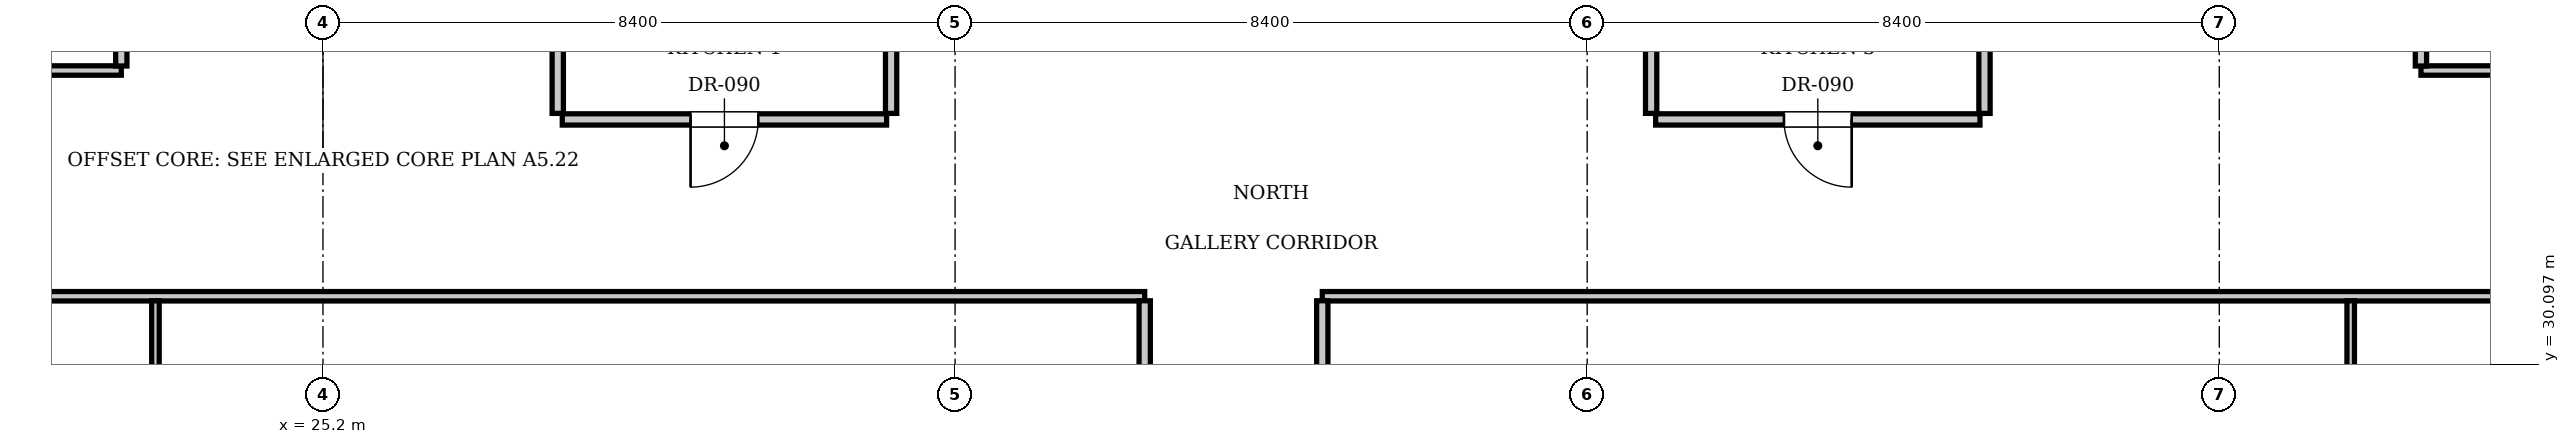
"""IFC4 building model, lengths in metres.
Left out: names, types, materials, properties, quantities, classifications, styles, units other than length and angle.
Written with IfcOpenShell. Run it as: python <this file> out.ifc"""

import sys

from ifc_helpers import new_model, si_unit, direction, frame, frame_2d, origin, place, context, subcontext, project, spatial, rectangle, extrude, element, fill, save


model = new_model("IFC4")
c1 = context("Model", 3, precision=1e-05, world=origin(), true_north=direction((0.0, 1.0)))
c2 = subcontext(c1, "Body", "Model", "MODEL_VIEW")
j1 = project(units=[si_unit("LENGTHUNIT", "METRE"), si_unit("PLANEANGLEUNIT", "RADIAN")], contexts=[c1])
p1 = place(None, origin())
s1 = spatial("IfcSite", under=j1, at=p1, CompositionType="ELEMENT")
p2 = place(p1, origin())
s2 = spatial("IfcBuilding", under=s1, at=p2, CompositionType="ELEMENT")
p3 = place(p2, frame((0.0, 0.0, 169.75)))
s3 = spatial("IfcBuildingStorey", under=s2, at=p3, CompositionType="ELEMENT", Elevation=169.75)
for number, where, z_axis, x_axis in (
    (1, (28.32, 33.43, 0.0), (0.0, 0.0, 1.0), (0.0, 1.0, 0.0)),
    (2, (32.75, 33.43, 0.0), (0.0, 0.0, 1.0), (0.0, 1.0, 0.0)),
):
    element("IfcWall", number, at=place(p3, frame(where, z_axis=z_axis, x_axis=x_axis)), inside=s3, PredefinedType="PARTITIONING", context=c2, shape_type="SweptSolid", body=[
        extrude(rectangle(XDim=2.69, YDim=0.15, at=frame_2d((1.345, 0.0))), origin(), (0.0, 0.0, 1.0), 3.61),
    ])
p4 = place(p3, frame((28.38, 33.35, 0.0), z_axis=(0.0, 0.0, 1.0), x_axis=(1.0, 0.0, 0.0)))
e3 = element("IfcWall", 3, at=p4, inside=s3, PredefinedType="PARTITIONING", context=c2, shape_type="SweptSolid", body=[
    extrude(rectangle(XDim=4.31, YDim=0.15, at=frame_2d((2.155, 0.0))), origin(), (0.0, 0.0, 1.0), 3.61),
])
p5 = place(p4, frame((1.705, 0.0, 0.0)))
e4 = element("IfcOpeningElement", 4, at=p5, cuts=e3, PredefinedType="OPENING", context=c2, shape_type="SweptSolid", body=[
    extrude(rectangle(XDim=0.9, YDim=2.1, at=frame_2d((0.45, 1.05))), frame((0.0, 0.085, 0.0), z_axis=(0.0, -1.0, 0.0), x_axis=(1.0, 0.0, 0.0)), (0.0, 0.0, 1.0), 0.17),
])
for number, where, z_axis, x_axis in (
    (5, (42.85, 33.43, 0.0), (0.0, 0.0, 1.0), (0.0, 1.0, 0.0)),
    (6, (47.28, 33.43, 0.0), (0.0, 0.0, 1.0), (0.0, 1.0, 0.0)),
):
    element("IfcWall", number, at=place(p3, frame(where, z_axis=z_axis, x_axis=x_axis)), inside=s3, PredefinedType="PARTITIONING", context=c2, shape_type="SweptSolid", body=[
        extrude(rectangle(XDim=2.69, YDim=0.15, at=frame_2d((1.345, 0.0))), origin(), (0.0, 0.0, 1.0), 3.61),
    ])
p6 = place(p3, frame((42.91, 33.35, 0.0), z_axis=(0.0, 0.0, 1.0), x_axis=(1.0, 0.0, 0.0)))
e7 = element("IfcWall", 7, at=p6, inside=s3, PredefinedType="PARTITIONING", context=c2, shape_type="SweptSolid", body=[
    extrude(rectangle(XDim=4.31, YDim=0.15, at=frame_2d((2.155, 0.0))), origin(), (0.0, 0.0, 1.0), 3.61),
])
p7 = place(p6, frame((1.705, 0.0, 0.0)))
e8 = element("IfcOpeningElement", 8, at=p7, cuts=e7, PredefinedType="OPENING", context=c2, shape_type="SweptSolid", body=[
    extrude(rectangle(XDim=0.9, YDim=2.1, at=frame_2d((0.45, 1.05))), frame((0.0, 0.085, 0.0), z_axis=(0.0, -1.0, 0.0), x_axis=(1.0, 0.0, 0.0)), (0.0, 0.0, 1.0), 0.17),
])
p8 = place(p3, frame((13.2, 31.0, 0.0), z_axis=(0.0, 0.0, 1.0), x_axis=(1.0, 0.0, 0.0)))
e9 = element("IfcWall", 9, at=p8, inside=s3, PredefinedType="PARTITIONING", context=c2, shape_type="SweptSolid", body=[
    extrude(rectangle(XDim=22.92, YDim=0.125, at=frame_2d((11.46, 0.0))), origin(), (0.0, 0.0, 1.0), 3.61),
])
p9 = place(p3, frame((38.48, 31.0, 0.0), z_axis=(0.0, 0.0, 1.0), x_axis=(1.0, 0.0, 0.0)))
e10 = element("IfcWall", 10, at=p9, inside=s3, PredefinedType="PARTITIONING", context=c2, shape_type="SweptSolid", body=[
    extrude(rectangle(XDim=23.92, YDim=0.125, at=frame_2d((11.96, 0.0))), origin(), (0.0, 0.0, 1.0), 3.61),
])
p10 = place(p3, frame((36.12, 26.7, 0.0), z_axis=(0.0, 0.0, 1.0), x_axis=(0.0, 1.0, 0.0)))
e11 = element("IfcWall", 11, at=p10, inside=s3, PredefinedType="PARTITIONING", context=c2, shape_type="SweptSolid", body=[
    extrude(rectangle(XDim=4.24, YDim=0.15, at=frame_2d((2.12, 0.0))), origin(), (0.0, 0.0, 1.0), 3.61),
])
p11 = place(p10, frame((1.645, 0.0, 0.0)))
e12 = element("IfcOpeningElement", 12, at=p11, cuts=e11, PredefinedType="OPENING", context=c2, shape_type="SweptSolid", body=[
    extrude(rectangle(XDim=0.95, YDim=2.15, at=frame_2d((0.475, 1.075))), frame((0.0, 0.085, 0.0), z_axis=(0.0, -1.0, 0.0), x_axis=(1.0, 0.0, 0.0)), (0.0, 0.0, 1.0), 0.17),
])
p12 = place(p3, frame((22.974, 24.41, 0.0), z_axis=(0.0, 0.0, 1.0), x_axis=(0.0, 1.0, 0.0)))
e13 = element("IfcWall", 13, at=p12, inside=s3, PredefinedType="PARTITIONING", context=c2, shape_type="SweptSolid", body=[
    extrude(rectangle(XDim=6.53, YDim=0.1, at=frame_2d((3.265, 0.0))), origin(), (0.0, 0.0, 1.0), 3.61),
])
p13 = place(p12, frame((3.895, 0.0, 0.0)))
e14 = element("IfcOpeningElement", 14, at=p13, cuts=e13, PredefinedType="OPENING", context=c2, shape_type="SweptSolid", body=[
    extrude(rectangle(XDim=0.9, YDim=2.1, at=frame_2d((0.45, 1.05))), frame((0.0, 0.06, 0.0), z_axis=(0.0, -1.0, 0.0), x_axis=(1.0, 0.0, 0.0)), (0.0, 0.0, 1.0), 0.12),
])
p14 = place(p3, frame((38.48, 26.7, 0.0), z_axis=(0.0, 0.0, 1.0), x_axis=(0.0, 1.0, 0.0)))
e15 = element("IfcWall", 15, at=p14, inside=s3, PredefinedType="PARTITIONING", context=c2, shape_type="SweptSolid", body=[
    extrude(rectangle(XDim=4.24, YDim=0.15, at=frame_2d((2.12, 0.0))), origin(), (0.0, 0.0, 1.0), 3.61),
])
p15 = place(p14, frame((1.645, 0.0, 0.0)))
e16 = element("IfcOpeningElement", 16, at=p15, cuts=e15, PredefinedType="OPENING", context=c2, shape_type="SweptSolid", body=[
    extrude(rectangle(XDim=0.95, YDim=2.15, at=frame_2d((0.475, 1.075))), frame((0.0, 0.085, 0.0), z_axis=(0.0, -1.0, 0.0), x_axis=(1.0, 0.0, 0.0)), (0.0, 0.0, 1.0), 0.17),
])
p16 = place(p3, frame((52.146, 24.41, 0.0), z_axis=(0.0, 0.0, 1.0), x_axis=(0.0, 1.0, 0.0)))
e17 = element("IfcWall", 17, at=p16, inside=s3, PredefinedType="PARTITIONING", context=c2, shape_type="SweptSolid", body=[
    extrude(rectangle(XDim=6.53, YDim=0.1, at=frame_2d((3.265, 0.0))), origin(), (0.0, 0.0, 1.0), 3.61),
])
p17 = place(p16, frame((3.895, 0.0, 0.0)))
e18 = element("IfcOpeningElement", 18, at=p17, cuts=e17, PredefinedType="OPENING", context=c2, shape_type="SweptSolid", body=[
    extrude(rectangle(XDim=0.9, YDim=2.1, at=frame_2d((0.45, 1.05))), frame((0.0, 0.06, 0.0), z_axis=(0.0, -1.0, 0.0), x_axis=(1.0, 0.0, 0.0)), (0.0, 0.0, 1.0), 0.12),
])
p18 = place(p3, frame((13.2, 34.0, 0.0), z_axis=(0.0, 0.0, 1.0), x_axis=(1.0, 0.0, 0.0)))
e19 = element("IfcWall", 19, at=p18, inside=s3, PredefinedType="PARTITIONING", context=c2, shape_type="SweptSolid", body=[
    extrude(rectangle(XDim=9.32, YDim=0.125, at=frame_2d((4.66, 0.0))), origin(), (0.0, 0.0, 1.0), 3.61),
])
p19 = place(p3, frame((53.08, 34.0, 0.0), z_axis=(0.0, 0.0, 1.0), x_axis=(1.0, 0.0, 0.0)))
e20 = element("IfcWall", 20, at=p19, inside=s3, PredefinedType="PARTITIONING", context=c2, shape_type="SweptSolid", body=[
    extrude(rectangle(XDim=9.32, YDim=0.125, at=frame_2d((4.66, 0.0))), origin(), (0.0, 0.0, 1.0), 3.61),
])
p20 = place(p3, frame((22.52, 34.06, 0.0), z_axis=(0.0, 0.0, 1.0), x_axis=(0.0, 1.0, 0.0)))
e21 = element("IfcWall", 21, at=p20, inside=s3, PredefinedType="PARTITIONING", context=c2, shape_type="SweptSolid", body=[
    extrude(rectangle(XDim=13.127, YDim=0.15, at=frame_2d((6.564, 0.0))), origin(), (0.0, 0.0, 1.0), 3.61),
])
p21 = place(p20, frame((6.089, 0.0, 0.0)))
e22 = element("IfcOpeningElement", 22, at=p21, cuts=e21, PredefinedType="OPENING", context=c2, shape_type="SweptSolid", body=[
    extrude(rectangle(XDim=0.95, YDim=2.15, at=frame_2d((0.475, 1.075))), frame((0.0, 0.085, 0.0), z_axis=(0.0, -1.0, 0.0), x_axis=(1.0, 0.0, 0.0)), (0.0, 0.0, 1.0), 0.17),
])
p22 = place(p3, frame((53.08, 34.06, 0.0), z_axis=(0.0, 0.0, 1.0), x_axis=(0.0, 1.0, 0.0)))
e23 = element("IfcWall", 23, at=p22, inside=s3, PredefinedType="PARTITIONING", context=c2, shape_type="SweptSolid", body=[
    extrude(rectangle(XDim=13.127, YDim=0.15, at=frame_2d((6.564, 0.0))), origin(), (0.0, 0.0, 1.0), 3.61),
])
p23 = place(p22, frame((6.089, 0.0, 0.0)))
e24 = element("IfcOpeningElement", 24, at=p23, cuts=e23, PredefinedType="OPENING", context=c2, shape_type="SweptSolid", body=[
    extrude(rectangle(XDim=0.95, YDim=2.15, at=frame_2d((0.475, 1.075))), frame((0.0, 0.085, 0.0), z_axis=(0.0, -1.0, 0.0), x_axis=(1.0, 0.0, 0.0)), (0.0, 0.0, 1.0), 0.17),
])
p24 = place(p5, frame((0.9, 0.0, 0.0), z_axis=(0.0, 0.0, 1.0), x_axis=(-1.0, 0.0, 0.0)))
e25 = element("IfcDoor", 25, at=p24, inside=s3, OperationType="SINGLE_SWING_RIGHT", PredefinedType="DOOR", context=c2, shape_type="SweptSolid", body=[
    extrude(rectangle(XDim=0.9, YDim=2.1, at=frame_2d((0.45, 1.05))), frame((0.0, 0.025, 0.0), z_axis=(0.0, -1.0, 0.0), x_axis=(1.0, 0.0, 0.0)), (0.0, 0.0, 1.0), 0.05),
])
fill(e4, e25)
p25 = place(p7, frame((0.9, 0.0, 0.0), z_axis=(0.0, 0.0, 1.0), x_axis=(-1.0, 0.0, 0.0)))
e26 = element("IfcDoor", 26, at=p25, inside=s3, OperationType="SINGLE_SWING_LEFT", PredefinedType="DOOR", context=c2, shape_type="SweptSolid", body=[
    extrude(rectangle(XDim=0.9, YDim=2.1, at=frame_2d((0.45, 1.05))), frame((0.0, 0.025, 0.0), z_axis=(0.0, -1.0, 0.0), x_axis=(1.0, 0.0, 0.0)), (0.0, 0.0, 1.0), 0.05),
])
fill(e8, e26)
save(model, sys.argv[1])
